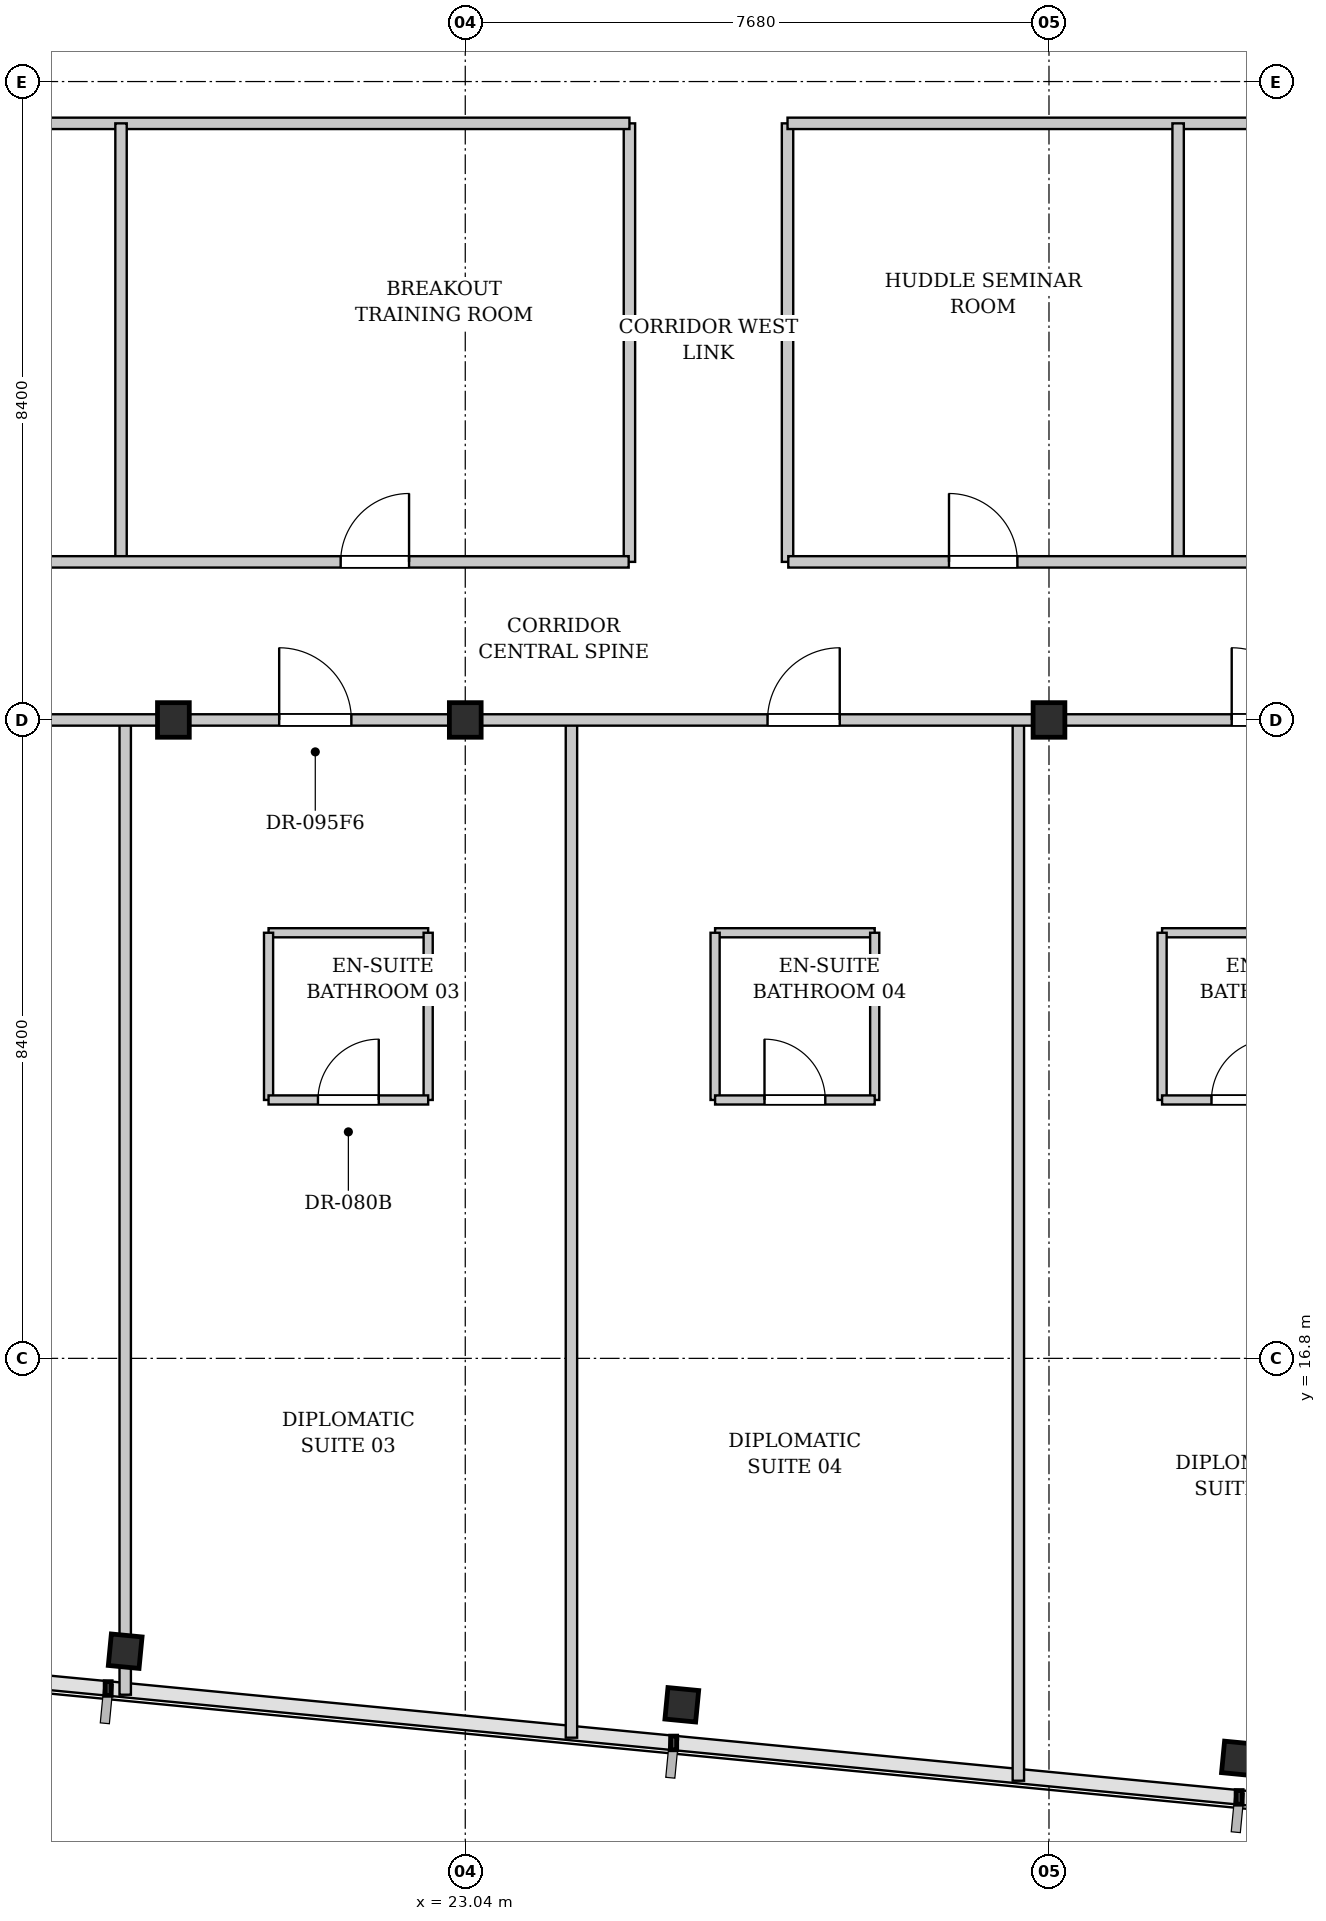
"""IFC4 building model, lengths in metres.
Left out: names, types, materials, properties, quantities, classifications, styles, units other than length and angle.
Written with IfcOpenShell. Run it as: python <this file> out.ifc"""

import sys

from ifc_helpers import new_model, si_unit, direction, frame, frame_2d, origin, origin_2d, place, context, subcontext, project, spatial, rectangle, i_section, extrude, element, fill, save


model = new_model("IFC4")
c1 = context("Model", 3, precision=1e-05, world=origin(), true_north=direction((0.0, 1.0)))
c2 = subcontext(c1, "Body", "Model", "MODEL_VIEW")
j1 = project(units=[si_unit("LENGTHUNIT", "METRE"), si_unit("PLANEANGLEUNIT", "RADIAN")], contexts=[c1])
p1 = place(None, origin())
s1 = spatial("IfcSite", under=j1, at=p1, CompositionType="ELEMENT")
p2 = place(p1, origin())
s2 = spatial("IfcBuilding", under=s1, at=p2, CompositionType="ELEMENT")
p3 = place(p2, frame((0.0, 0.0, 155.6)))
s3 = spatial("IfcBuildingStorey", under=s2, at=p3, CompositionType="ELEMENT", Elevation=155.6)
for number, where, z_axis, x_axis in (
    (1, (23.04, 25.2, 0.0), (0.0, 0.0, 1.0), (1.0, 0.0, 0.0)),
    (2, (30.72, 25.2, 0.0), (0.0, 0.0, 1.0), (1.0, 0.0, 0.0)),
    (3, (19.2, 25.2, 0.0), (0.0, 0.0, 1.0), (1.0, 0.0, 0.0)),
):
    element("IfcColumn", number, at=place(p3, frame(where, z_axis=z_axis, x_axis=x_axis)), inside=s3, PredefinedType="COLUMN", context=c2, shape_type="SweptSolid", body=[
        extrude(i_section(OverallWidth=0.418, OverallDepth=0.455, WebThickness=0.042, FlangeThickness=0.068, FilletRadius=0.015, at=origin_2d()), origin(), (0.0, 0.0, 1.0), 3.3),
    ])
for number, where, z_axis, x_axis in (
    (4, (18.566, 12.947, 0.0), (0.0, 0.0, 1.0), (0.995, -0.096, 0.0)),
    (5, (25.889, 12.242, 0.0), (0.0, 0.0, 1.0), (0.995, -0.096, 0.0)),
    (6, (33.212, 11.537, 0.0), (0.0, 0.0, 1.0), (0.995, -0.096, 0.0)),
):
    element("IfcColumn", number, at=place(p3, frame(where, z_axis=z_axis, x_axis=x_axis)), inside=s3, PredefinedType="COLUMN", context=c2, shape_type="SweptSolid", body=[
        extrude(i_section(OverallWidth=0.406, OverallDepth=0.416, WebThickness=0.03, FlangeThickness=0.048, FilletRadius=0.015, at=origin_2d()), origin(), (0.0, 0.0, 1.0), 3.3),
    ])
p4 = place(p3, frame((20.452, 22.4, 0.0), z_axis=(0.0, 0.0, 1.0), x_axis=(1.0, 0.0, 0.0)))
e7 = element("IfcWall", 7, at=p4, inside=s3, PredefinedType="PARTITIONING", context=c2, shape_type="SweptSolid", body=[
    extrude(rectangle(XDim=2.1, YDim=0.12, at=frame_2d((1.05, 0.0))), origin(), (0.0, 0.0, 1.0), 3.08),
])
for number, where, z_axis, x_axis in (
    (8, (20.452, 20.2, 0.0), (0.0, 0.0, 1.0), (0.0, 1.0, 0.0)),
    (9, (22.552, 20.2, 0.0), (0.0, 0.0, 1.0), (0.0, 1.0, 0.0)),
):
    element("IfcWall", number, at=place(p3, frame(where, z_axis=z_axis, x_axis=x_axis)), inside=s3, PredefinedType="PARTITIONING", context=c2, shape_type="SweptSolid", body=[
        extrude(rectangle(XDim=2.2, YDim=0.12, at=frame_2d((1.1, 0.0))), origin(), (0.0, 0.0, 1.0), 3.08),
    ])
p5 = place(p3, frame((20.452, 20.2, 0.0), z_axis=(0.0, 0.0, 1.0), x_axis=(1.0, 0.0, 0.0)))
e10 = element("IfcWall", 10, at=p5, inside=s3, PredefinedType="PARTITIONING", context=c2, shape_type="SweptSolid", body=[
    extrude(rectangle(XDim=2.1, YDim=0.12, at=frame_2d((1.05, 0.0))), origin(), (0.0, 0.0, 1.0), 3.08),
])
p6 = place(p5, frame((0.65, 0.0, 0.0)))
e11 = element("IfcOpeningElement", 11, at=p6, cuts=e10, PredefinedType="OPENING", context=c2, shape_type="SweptSolid", body=[
    extrude(rectangle(XDim=0.8, YDim=2.1, at=frame_2d((0.4, 1.05))), frame((0.0, 0.07, 0.0), z_axis=(0.0, -1.0, 0.0), x_axis=(1.0, 0.0, 0.0)), (0.0, 0.0, 1.0), 0.14),
])
p7 = place(p3, frame((18.566, 12.374, 0.0), z_axis=(0.0, 0.0, 1.0), x_axis=(0.0, 1.0, 0.0)))
e12 = element("IfcWall", 12, at=p7, inside=s3, PredefinedType="PARTITIONING", context=c2, shape_type="SweptSolid", body=[
    extrude(rectangle(XDim=12.846, YDim=0.15, at=frame_2d((6.423, 0.0))), origin(), (0.0, 0.0, 1.0), 2.475),
])
p8 = place(p3, frame((26.327, 22.4, 0.0), z_axis=(0.0, 0.0, 1.0), x_axis=(1.0, 0.0, 0.0)))
e13 = element("IfcWall", 13, at=p8, inside=s3, PredefinedType="PARTITIONING", context=c2, shape_type="SweptSolid", body=[
    extrude(rectangle(XDim=2.1, YDim=0.12, at=frame_2d((1.05, 0.0))), origin(), (0.0, 0.0, 1.0), 3.08),
])
for number, where, z_axis, x_axis in (
    (14, (26.327, 20.2, 0.0), (0.0, 0.0, 1.0), (0.0, 1.0, 0.0)),
    (15, (28.427, 20.2, 0.0), (0.0, 0.0, 1.0), (0.0, 1.0, 0.0)),
):
    element("IfcWall", number, at=place(p3, frame(where, z_axis=z_axis, x_axis=x_axis)), inside=s3, PredefinedType="PARTITIONING", context=c2, shape_type="SweptSolid", body=[
        extrude(rectangle(XDim=2.2, YDim=0.12, at=frame_2d((1.1, 0.0))), origin(), (0.0, 0.0, 1.0), 3.08),
    ])
p9 = place(p3, frame((26.327, 20.2, 0.0), z_axis=(0.0, 0.0, 1.0), x_axis=(1.0, 0.0, 0.0)))
e16 = element("IfcWall", 16, at=p9, inside=s3, PredefinedType="PARTITIONING", context=c2, shape_type="SweptSolid", body=[
    extrude(rectangle(XDim=2.1, YDim=0.12, at=frame_2d((1.05, 0.0))), origin(), (0.0, 0.0, 1.0), 3.08),
])
p10 = place(p9, frame((0.65, 0.0, 0.0)))
e17 = element("IfcOpeningElement", 17, at=p10, cuts=e16, PredefinedType="OPENING", context=c2, shape_type="SweptSolid", body=[
    extrude(rectangle(XDim=0.8, YDim=2.1, at=frame_2d((0.4, 1.05))), frame((0.0, 0.07, 0.0), z_axis=(0.0, -1.0, 0.0), x_axis=(1.0, 0.0, 0.0)), (0.0, 0.0, 1.0), 0.14),
])
p11 = place(p3, frame((24.437, 11.809, 0.0), z_axis=(0.0, 0.0, 1.0), x_axis=(0.0, 1.0, 0.0)))
e18 = element("IfcWall", 18, at=p11, inside=s3, PredefinedType="PARTITIONING", context=c2, shape_type="SweptSolid", body=[
    extrude(rectangle(XDim=13.411, YDim=0.15, at=frame_2d((6.706, 0.0))), origin(), (0.0, 0.0, 1.0), 2.475),
])
p12 = place(p3, frame((32.208, 22.4, 0.0), z_axis=(0.0, 0.0, 1.0), x_axis=(1.0, 0.0, 0.0)))
e19 = element("IfcWall", 19, at=p12, inside=s3, PredefinedType="PARTITIONING", context=c2, shape_type="SweptSolid", body=[
    extrude(rectangle(XDim=2.1, YDim=0.12, at=frame_2d((1.05, 0.0))), origin(), (0.0, 0.0, 1.0), 3.08),
])
p13 = place(p3, frame((32.208, 20.2, 0.0), z_axis=(0.0, 0.0, 1.0), x_axis=(0.0, 1.0, 0.0)))
e20 = element("IfcWall", 20, at=p13, inside=s3, PredefinedType="PARTITIONING", context=c2, shape_type="SweptSolid", body=[
    extrude(rectangle(XDim=2.2, YDim=0.12, at=frame_2d((1.1, 0.0))), origin(), (0.0, 0.0, 1.0), 3.08),
])
p14 = place(p3, frame((32.208, 20.2, 0.0), z_axis=(0.0, 0.0, 1.0), x_axis=(1.0, 0.0, 0.0)))
e21 = element("IfcWall", 21, at=p14, inside=s3, PredefinedType="PARTITIONING", context=c2, shape_type="SweptSolid", body=[
    extrude(rectangle(XDim=2.1, YDim=0.12, at=frame_2d((1.05, 0.0))), origin(), (0.0, 0.0, 1.0), 3.08),
])
p15 = place(p14, frame((0.65, 0.0, 0.0)))
e22 = element("IfcOpeningElement", 22, at=p15, cuts=e21, PredefinedType="OPENING", context=c2, shape_type="SweptSolid", body=[
    extrude(rectangle(XDim=0.8, YDim=2.1, at=frame_2d((0.4, 1.05))), frame((0.0, 0.07, 0.0), z_axis=(0.0, -1.0, 0.0), x_axis=(1.0, 0.0, 0.0)), (0.0, 0.0, 1.0), 0.14),
])
p16 = place(p3, frame((30.317, 11.243, 0.0), z_axis=(0.0, 0.0, 1.0), x_axis=(0.0, 1.0, 0.0)))
e23 = element("IfcWall", 23, at=p16, inside=s3, PredefinedType="PARTITIONING", context=c2, shape_type="SweptSolid", body=[
    extrude(rectangle(XDim=13.977, YDim=0.15, at=frame_2d((6.989, 0.0))), origin(), (0.0, 0.0, 1.0), 3.08),
])
p17 = place(p3, frame((2.08, 25.2, 0.0), z_axis=(0.0, 0.0, 1.0), x_axis=(1.0, 0.0, 0.0)))
e24 = element("IfcWall", 24, at=p17, inside=s3, PredefinedType="PARTITIONING", context=c2, shape_type="SweptSolid", body=[
    extrude(rectangle(XDim=57.505, YDim=0.15, at=frame_2d((28.752, 0.0))), origin(), (0.0, 0.0, 1.0), 2.475),
])
p18 = place(p17, frame((8.662, 0.0, 0.0)))
e25 = element("IfcOpeningElement", 25, at=p18, cuts=e24, PredefinedType="OPENING", context=c2, shape_type="SweptSolid", body=[
    extrude(rectangle(XDim=0.95, YDim=2.15, at=frame_2d((0.475, 1.075))), frame((0.0, 0.085, 0.0), z_axis=(0.0, -1.0, 0.0), x_axis=(1.0, 0.0, 0.0)), (0.0, 0.0, 1.0), 0.17),
])
p19 = place(p17, frame((13.504, 0.0, 0.0)))
e26 = element("IfcOpeningElement", 26, at=p19, cuts=e24, PredefinedType="OPENING", context=c2, shape_type="SweptSolid", body=[
    extrude(rectangle(XDim=0.95, YDim=2.15, at=frame_2d((0.475, 1.075))), frame((0.0, 0.085, 0.0), z_axis=(0.0, -1.0, 0.0), x_axis=(1.0, 0.0, 0.0)), (0.0, 0.0, 1.0), 0.17),
])
p20 = place(p17, frame((18.512, 0.0, 0.0)))
e27 = element("IfcOpeningElement", 27, at=p20, cuts=e24, PredefinedType="OPENING", context=c2, shape_type="SweptSolid", body=[
    extrude(rectangle(XDim=0.95, YDim=2.15, at=frame_2d((0.475, 1.075))), frame((0.0, 0.085, 0.0), z_axis=(0.0, -1.0, 0.0), x_axis=(1.0, 0.0, 0.0)), (0.0, 0.0, 1.0), 0.17),
])
p21 = place(p17, frame((24.937, 0.0, 0.0)))
e28 = element("IfcOpeningElement", 28, at=p21, cuts=e24, PredefinedType="OPENING", context=c2, shape_type="SweptSolid", body=[
    extrude(rectangle(XDim=0.95, YDim=2.15, at=frame_2d((0.475, 1.075))), frame((0.0, 0.085, 0.0), z_axis=(0.0, -1.0, 0.0), x_axis=(1.0, 0.0, 0.0)), (0.0, 0.0, 1.0), 0.17),
])
p22 = place(p17, frame((31.044, 0.0, 0.0)))
e29 = element("IfcOpeningElement", 29, at=p22, cuts=e24, PredefinedType="OPENING", context=c2, shape_type="SweptSolid", body=[
    extrude(rectangle(XDim=0.95, YDim=2.15, at=frame_2d((0.475, 1.075))), frame((0.0, 0.085, 0.0), z_axis=(0.0, -1.0, 0.0), x_axis=(1.0, 0.0, 0.0)), (0.0, 0.0, 1.0), 0.17),
])
p23 = place(p17, frame((37.897, 0.0, 0.0)))
e30 = element("IfcOpeningElement", 30, at=p23, cuts=e24, PredefinedType="OPENING", context=c2, shape_type="SweptSolid", body=[
    extrude(rectangle(XDim=0.95, YDim=2.15, at=frame_2d((0.475, 1.075))), frame((0.0, 0.085, 0.0), z_axis=(0.0, -1.0, 0.0), x_axis=(1.0, 0.0, 0.0)), (0.0, 0.0, 1.0), 0.17),
])
p24 = place(p17, frame((41.489, 0.0, 0.0)))
e31 = element("IfcOpeningElement", 31, at=p24, cuts=e24, PredefinedType="OPENING", context=c2, shape_type="SweptSolid", body=[
    extrude(rectangle(XDim=0.95, YDim=2.15, at=frame_2d((0.475, 1.075))), frame((0.0, 0.085, 0.0), z_axis=(0.0, -1.0, 0.0), x_axis=(1.0, 0.0, 0.0)), (0.0, 0.0, 1.0), 0.17),
])
p25 = place(p17, frame((47.351, 0.0, 0.0)))
e32 = element("IfcOpeningElement", 32, at=p25, cuts=e24, PredefinedType="OPENING", context=c2, shape_type="SweptSolid", body=[
    extrude(rectangle(XDim=0.95, YDim=2.15, at=frame_2d((0.475, 1.075))), frame((0.0, 0.085, 0.0), z_axis=(0.0, -1.0, 0.0), x_axis=(1.0, 0.0, 0.0)), (0.0, 0.0, 1.0), 0.17),
])
p26 = place(p17, frame((50.092, 0.0, 0.0)))
e33 = element("IfcOpeningElement", 33, at=p26, cuts=e24, PredefinedType="OPENING", context=c2, shape_type="SweptSolid", body=[
    extrude(rectangle(XDim=0.95, YDim=2.15, at=frame_2d((0.475, 1.075))), frame((0.0, 0.085, 0.0), z_axis=(0.0, -1.0, 0.0), x_axis=(1.0, 0.0, 0.0)), (0.0, 0.0, 1.0), 0.17),
])
for number, where, z_axis, x_axis in (
    (34, (25.2, 27.28, 0.0), (0.0, 0.0, 1.0), (0.0, 1.0, 0.0)),
    (35, (27.28, 27.28, 0.0), (0.0, 0.0, 1.0), (0.0, 1.0, 0.0)),
):
    element("IfcWall", number, at=place(p3, frame(where, z_axis=z_axis, x_axis=x_axis)), inside=s3, PredefinedType="PARTITIONING", context=c2, shape_type="SweptSolid", body=[
        extrude(rectangle(XDim=5.77, YDim=0.15, at=frame_2d((2.885, 0.0))), origin(), (0.0, 0.0, 1.0), 3.08),
    ])
p27 = place(p3, frame((8.88, 33.05, 0.0), z_axis=(0.0, 0.0, 1.0), x_axis=(1.0, 0.0, 0.0)))
e36 = element("IfcWall", 36, at=p27, inside=s3, PredefinedType="PARTITIONING", context=c2, shape_type="SweptSolid", body=[
    extrude(rectangle(XDim=16.32, YDim=0.15, at=frame_2d((8.16, 0.0))), origin(), (0.0, 0.0, 1.0), 2.475),
])
p28 = place(p3, frame((27.28, 33.05, 0.0), z_axis=(0.0, 0.0, 1.0), x_axis=(1.0, 0.0, 0.0)))
e37 = element("IfcWall", 37, at=p28, inside=s3, PredefinedType="PARTITIONING", context=c2, shape_type="SweptSolid", body=[
    extrude(rectangle(XDim=22.32, YDim=0.15, at=frame_2d((11.16, 0.0))), origin(), (0.0, 0.0, 1.0), 3.08),
])
p29 = place(p3, frame((18.511, 27.28, 0.0), z_axis=(0.0, 0.0, 1.0), x_axis=(0.0, 1.0, 0.0)))
e38 = element("IfcWall", 38, at=p29, inside=s3, PredefinedType="PARTITIONING", context=c2, shape_type="SweptSolid", body=[
    extrude(rectangle(XDim=5.77, YDim=0.15, at=frame_2d((2.885, 0.0))), origin(), (0.0, 0.0, 1.0), 3.08),
])
p30 = place(p3, frame((8.9, 27.28, 0.0), z_axis=(0.0, 0.0, 1.0), x_axis=(1.0, 0.0, 0.0)))
e39 = element("IfcWall", 39, at=p30, inside=s3, PredefinedType="PARTITIONING", context=c2, shape_type="SweptSolid", body=[
    extrude(rectangle(XDim=16.29, YDim=0.15, at=frame_2d((8.145, 0.0))), origin(), (0.0, 0.0, 1.0), 2.475),
])
p31 = place(p30, frame((1.424, 0.0, 0.0)))
e40 = element("IfcOpeningElement", 40, at=p31, cuts=e39, PredefinedType="OPENING", context=c2, shape_type="SweptSolid", body=[
    extrude(rectangle(XDim=0.9, YDim=2.15, at=frame_2d((0.45, 1.075))), frame((0.0, 0.085, 0.0), z_axis=(0.0, -1.0, 0.0), x_axis=(1.0, 0.0, 0.0)), (0.0, 0.0, 1.0), 0.17),
])
p32 = place(p30, frame((6.229, 0.0, 0.0)))
e41 = element("IfcOpeningElement", 41, at=p32, cuts=e39, PredefinedType="OPENING", context=c2, shape_type="SweptSolid", body=[
    extrude(rectangle(XDim=0.9, YDim=2.15, at=frame_2d((0.45, 1.075))), frame((0.0, 0.085, 0.0), z_axis=(0.0, -1.0, 0.0), x_axis=(1.0, 0.0, 0.0)), (0.0, 0.0, 1.0), 0.17),
])
p33 = place(p30, frame((12.5, 0.0, 0.0)))
e42 = element("IfcOpeningElement", 42, at=p33, cuts=e39, PredefinedType="OPENING", context=c2, shape_type="SweptSolid", body=[
    extrude(rectangle(XDim=0.9, YDim=2.15, at=frame_2d((0.45, 1.075))), frame((0.0, 0.085, 0.0), z_axis=(0.0, -1.0, 0.0), x_axis=(1.0, 0.0, 0.0)), (0.0, 0.0, 1.0), 0.17),
])
p34 = place(p3, frame((32.419, 27.28, 0.0), z_axis=(0.0, 0.0, 1.0), x_axis=(0.0, 1.0, 0.0)))
e43 = element("IfcWall", 43, at=p34, inside=s3, PredefinedType="PARTITIONING", context=c2, shape_type="SweptSolid", body=[
    extrude(rectangle(XDim=5.77, YDim=0.15, at=frame_2d((2.885, 0.0))), origin(), (0.0, 0.0, 1.0), 3.08),
])
p35 = place(p3, frame((27.29, 27.28, 0.0), z_axis=(0.0, 0.0, 1.0), x_axis=(1.0, 0.0, 0.0)))
e44 = element("IfcWall", 44, at=p35, inside=s3, PredefinedType="PARTITIONING", context=c2, shape_type="SweptSolid", body=[
    extrude(rectangle(XDim=22.3, YDim=0.15, at=frame_2d((11.15, 0.0))), origin(), (0.0, 0.0, 1.0), 3.08),
])
p36 = place(p35, frame((2.115, 0.0, 0.0)))
e45 = element("IfcOpeningElement", 45, at=p36, cuts=e44, PredefinedType="OPENING", context=c2, shape_type="SweptSolid", body=[
    extrude(rectangle(XDim=0.9, YDim=2.15, at=frame_2d((0.45, 1.075))), frame((0.0, 0.085, 0.0), z_axis=(0.0, -1.0, 0.0), x_axis=(1.0, 0.0, 0.0)), (0.0, 0.0, 1.0), 0.17),
])
p37 = place(p35, frame((8.693, 0.0, 0.0)))
e46 = element("IfcOpeningElement", 46, at=p37, cuts=e44, PredefinedType="OPENING", context=c2, shape_type="SweptSolid", body=[
    extrude(rectangle(XDim=0.9, YDim=2.15, at=frame_2d((0.45, 1.075))), frame((0.0, 0.085, 0.0), z_axis=(0.0, -1.0, 0.0), x_axis=(1.0, 0.0, 0.0)), (0.0, 0.0, 1.0), 0.17),
])
p38 = place(p35, frame((17.279, 0.0, 0.0)))
e47 = element("IfcOpeningElement", 47, at=p38, cuts=e44, PredefinedType="OPENING", context=c2, shape_type="SweptSolid", body=[
    extrude(rectangle(XDim=0.9, YDim=2.15, at=frame_2d((0.45, 1.075))), frame((0.0, 0.085, 0.0), z_axis=(0.0, -1.0, 0.0), x_axis=(1.0, 0.0, 0.0)), (0.0, 0.0, 1.0), 0.17),
])
p39 = place(p6, origin())
e48 = element("IfcDoor", 48, at=p39, inside=s3, OperationType="SINGLE_SWING_RIGHT", PredefinedType="DOOR", context=c2, shape_type="SweptSolid", body=[
    extrude(rectangle(XDim=0.8, YDim=2.1, at=frame_2d((0.4, 1.05))), frame((0.0, 0.025, 0.0), z_axis=(0.0, -1.0, 0.0), x_axis=(1.0, 0.0, 0.0)), (0.0, 0.0, 1.0), 0.05),
])
fill(e11, e48)
p40 = place(p10, origin())
e49 = element("IfcDoor", 49, at=p40, inside=s3, OperationType="SINGLE_SWING_LEFT", PredefinedType="DOOR", context=c2, shape_type="SweptSolid", body=[
    extrude(rectangle(XDim=0.8, YDim=2.1, at=frame_2d((0.4, 1.05))), frame((0.0, 0.025, 0.0), z_axis=(0.0, -1.0, 0.0), x_axis=(1.0, 0.0, 0.0)), (0.0, 0.0, 1.0), 0.05),
])
fill(e17, e49)
p41 = place(p15, origin())
e50 = element("IfcDoor", 50, at=p41, inside=s3, OperationType="SINGLE_SWING_RIGHT", PredefinedType="DOOR", context=c2, shape_type="SweptSolid", body=[
    extrude(rectangle(XDim=0.8, YDim=2.1, at=frame_2d((0.4, 1.05))), frame((0.0, 0.025, 0.0), z_axis=(0.0, -1.0, 0.0), x_axis=(1.0, 0.0, 0.0)), (0.0, 0.0, 1.0), 0.05),
])
fill(e22, e50)
p42 = place(p20, origin())
e51 = element("IfcDoor", 51, at=p42, inside=s3, OperationType="SINGLE_SWING_LEFT", PredefinedType="DOOR", context=c2, shape_type="SweptSolid", body=[
    extrude(rectangle(XDim=0.95, YDim=2.15, at=frame_2d((0.475, 1.075))), frame((0.0, 0.025, 0.0), z_axis=(0.0, -1.0, 0.0), x_axis=(1.0, 0.0, 0.0)), (0.0, 0.0, 1.0), 0.05),
])
fill(e27, e51)
p43 = place(p21, origin())
e52 = element("IfcDoor", 52, at=p43, inside=s3, OperationType="SINGLE_SWING_RIGHT", PredefinedType="DOOR", context=c2, shape_type="SweptSolid", body=[
    extrude(rectangle(XDim=0.95, YDim=2.15, at=frame_2d((0.475, 1.075))), frame((0.0, 0.025, 0.0), z_axis=(0.0, -1.0, 0.0), x_axis=(1.0, 0.0, 0.0)), (0.0, 0.0, 1.0), 0.05),
])
fill(e28, e52)
p44 = place(p22, origin())
e53 = element("IfcDoor", 53, at=p44, inside=s3, OperationType="SINGLE_SWING_LEFT", PredefinedType="DOOR", context=c2, shape_type="SweptSolid", body=[
    extrude(rectangle(XDim=0.95, YDim=2.15, at=frame_2d((0.475, 1.075))), frame((0.0, 0.025, 0.0), z_axis=(0.0, -1.0, 0.0), x_axis=(1.0, 0.0, 0.0)), (0.0, 0.0, 1.0), 0.05),
])
fill(e29, e53)
p45 = place(p33, origin())
e54 = element("IfcDoor", 54, at=p45, inside=s3, OperationType="SINGLE_SWING_RIGHT", PredefinedType="DOOR", context=c2, shape_type="SweptSolid", body=[
    extrude(rectangle(XDim=0.9, YDim=2.15, at=frame_2d((0.45, 1.075))), frame((0.0, 0.025, 0.0), z_axis=(0.0, -1.0, 0.0), x_axis=(1.0, 0.0, 0.0)), (0.0, 0.0, 1.0), 0.05),
])
fill(e42, e54)
p46 = place(p36, origin())
e55 = element("IfcDoor", 55, at=p46, inside=s3, OperationType="SINGLE_SWING_LEFT", PredefinedType="DOOR", context=c2, shape_type="SweptSolid", body=[
    extrude(rectangle(XDim=0.9, YDim=2.15, at=frame_2d((0.45, 1.075))), frame((0.0, 0.025, 0.0), z_axis=(0.0, -1.0, 0.0), x_axis=(1.0, 0.0, 0.0)), (0.0, 0.0, 1.0), 0.05),
])
fill(e45, e55)
save(model, sys.argv[1])
